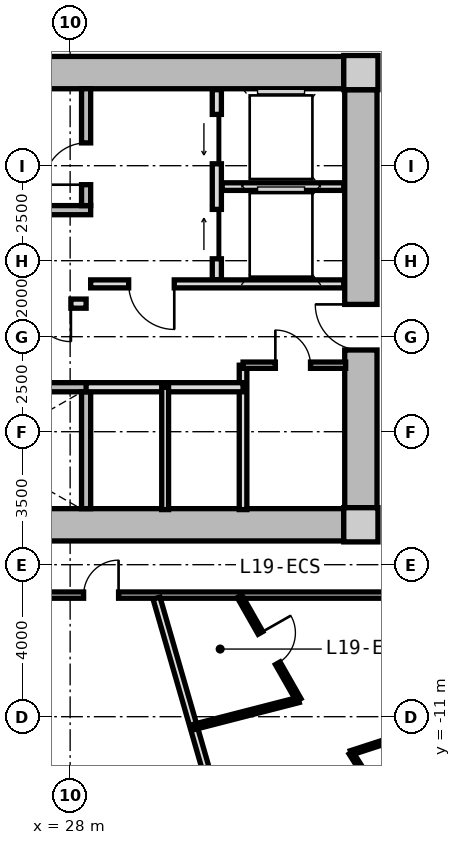
"""IFC4 building model, lengths in metres.
Left out: names, types, materials, properties, quantities, classifications, styles, units other than length and angle.
Written with IfcOpenShell. Run it as: python <this file> out.ifc"""

import sys

from ifc_helpers import new_model, si_unit, direction, frame, frame_2d, origin, origin_2d, place, context, subcontext, project, spatial, rectangle, extrude, source, transform, mapped, element, fill, save


model = new_model("IFC4")
c1 = context("Model", 3, precision=1e-05, world=origin(), true_north=direction((0.0, 1.0)))
c2 = subcontext(c1, "Body", "Model", "MODEL_VIEW")
j1 = project(units=[si_unit("LENGTHUNIT", "METRE"), si_unit("PLANEANGLEUNIT", "RADIAN")], contexts=[c1])
p1 = place(None, origin())
s1 = spatial("IfcSite", under=j1, at=p1, CompositionType="ELEMENT")
p2 = place(p1, origin())
s2 = spatial("IfcBuilding", under=s1, at=p2, CompositionType="ELEMENT")
p3 = place(p2, frame((0.0, 0.0, 64.3)))
s3 = spatial("IfcBuildingStorey", under=s2, at=p3, CompositionType="ELEMENT", Elevation=64.3)
m1 = source(origin(), c2, "Body", "SweptSolid", [
    extrude(rectangle(XDim=0.9, YDim=0.9, at=origin_2d()), origin(), (0.0, 0.0, 1.0), 3.05),
])
for number, where, z_axis, x_axis in (
    (1, (35.65, -5.95, 0.0), (0.0, 0.0, 1.0), (1.0, 0.0, 0.0)),
    (2, (35.65, 5.95, 0.0), (0.0, 0.0, 1.0), (1.0, 0.0, 0.0)),
):
    element("IfcColumn", number, at=place(p3, frame(where, z_axis=z_axis, x_axis=x_axis)), inside=s3, PredefinedType="COLUMN", context=c2, shape_type="MappedRepresentation", body=[
        mapped(m1, transform((0.0, 0.0, 0.0), x_axis=(1.0, 0.0, 0.0), y_axis=(0.0, 1.0, 0.0), z_axis=(0.0, 0.0, 1.0), scale=1.0)),
    ])
m2 = source(origin(), c2, "Body", "SweptSolid", [
    extrude(rectangle(XDim=14.4, YDim=0.85, at=frame_2d((7.2, 0.0))), origin(), (0.0, 0.0, 1.0), 2.79),
])
for number, where, z_axis, x_axis in (
    (3, (20.8, 5.95, 0.0), (0.0, 0.0, 1.0), (1.0, 0.0, 0.0)),
    (4, (35.2, -5.95, 0.0), (0.0, 0.0, 1.0), (-1.0, 0.0, 0.0)),
):
    element("IfcWall", number, at=place(p3, frame(where, z_axis=z_axis, x_axis=x_axis)), inside=s3, PredefinedType="SHEAR", context=c2, shape_type="MappedRepresentation", body=[
        mapped(m2, transform((0.0, 0.0, 0.0), x_axis=(1.0, 0.0, 0.0), y_axis=(0.0, 1.0, 0.0), z_axis=(0.0, 0.0, 1.0), scale=1.0)),
    ])
m3 = source(origin(), c2, "Body", "SweptSolid", [
    extrude(rectangle(XDim=11.0, YDim=0.85, at=frame_2d((5.5, 0.0))), origin(), (0.0, 0.0, 1.0), 2.79),
])
p4 = place(p3, frame((35.65, 5.5, 0.0), z_axis=(0.0, 0.0, 1.0), x_axis=(0.0, -1.0, 0.0)))
e5 = element("IfcWall", 5, at=p4, inside=s3, PredefinedType="SHEAR", context=c2, shape_type="MappedRepresentation", body=[
    mapped(m3, transform((0.0, 0.0, 0.0), x_axis=(1.0, 0.0, 0.0), y_axis=(0.0, 1.0, 0.0), z_axis=(0.0, 0.0, 1.0), scale=1.0)),
])
p5 = place(p4, frame((5.65, 0.0, 0.0)))
e6 = element("IfcOpeningElement", 6, at=p5, cuts=e5, PredefinedType="OPENING", context=c2, shape_type="SweptSolid", body=[
    extrude(rectangle(XDim=1.2, YDim=2.15, at=frame_2d((0.6, 1.075))), frame((0.0, 0.435, 0.0), z_axis=(0.0, -1.0, 0.0), x_axis=(1.0, 0.0, 0.0)), (0.0, 0.0, 1.0), 0.87),
])
m4 = source(origin(), c2, "Body", "SweptSolid", [
    extrude(rectangle(XDim=7.765, YDim=0.24, at=frame_2d((3.883, 0.0))), origin(), (0.0, 0.0, 1.0), 2.79),
])
p6 = place(p3, frame((20.775, 2.33, 0.0), z_axis=(0.0, 0.0, 1.0), x_axis=(1.0, 0.0, 0.0)))
e7 = element("IfcWall", 7, at=p6, inside=s3, PredefinedType="PARTITIONING", context=c2, shape_type="MappedRepresentation", body=[
    mapped(m4, transform((0.0, 0.0, 0.0), x_axis=(1.0, 0.0, 0.0), y_axis=(0.0, 1.0, 0.0), z_axis=(0.0, 0.0, 1.0), scale=1.0)),
])
m5 = source(origin(), c2, "Body", "SweptSolid", [
    extrude(rectangle(XDim=3.075, YDim=0.24, at=frame_2d((1.538, 0.0))), origin(), (0.0, 0.0, 1.0), 2.79),
])
p7 = place(p3, frame((28.42, 2.45, 0.0), z_axis=(0.0, 0.0, 1.0), x_axis=(0.0, 1.0, 0.0)))
e8 = element("IfcWall", 8, at=p7, inside=s3, PredefinedType="PARTITIONING", context=c2, shape_type="MappedRepresentation", body=[
    mapped(m5, transform((0.0, 0.0, 0.0), x_axis=(1.0, 0.0, 0.0), y_axis=(0.0, 1.0, 0.0), z_axis=(0.0, 0.0, 1.0), scale=1.0)),
])
p8 = place(p7, frame((0.55, 0.0, 0.0)))
e9 = element("IfcOpeningElement", 9, at=p8, cuts=e8, PredefinedType="OPENING", context=c2, shape_type="SweptSolid", body=[
    extrude(rectangle(XDim=1.1, YDim=2.15, at=frame_2d((0.55, 1.075))), frame((0.0, 0.13, 0.0), z_axis=(0.0, -1.0, 0.0), x_axis=(1.0, 0.0, 0.0)), (0.0, 0.0, 1.0), 0.26),
])
p9 = place(p3, frame((20.775, -2.33, 0.0), z_axis=(0.0, 0.0, 1.0), x_axis=(1.0, 0.0, 0.0)))
e10 = element("IfcWall", 10, at=p9, inside=s3, PredefinedType="PARTITIONING", context=c2, shape_type="MappedRepresentation", body=[
    mapped(m4, transform((0.0, 0.0, 0.0), x_axis=(1.0, 0.0, 0.0), y_axis=(0.0, 1.0, 0.0), z_axis=(0.0, 0.0, 1.0), scale=1.0)),
])
p10 = place(p9, frame((0.885, 0.0, 0.0)))
e11 = element("IfcOpeningElement", 11, at=p10, cuts=e10, PredefinedType="OPENING", context=c2, shape_type="SweptSolid", body=[
    extrude(rectangle(XDim=1.1, YDim=2.15, at=frame_2d((0.55, 1.075))), frame((0.0, 0.13, 0.0), z_axis=(0.0, -1.0, 0.0), x_axis=(1.0, 0.0, 0.0)), (0.0, 0.0, 1.0), 0.26),
])
p11 = place(p3, frame((28.42, -5.525, 0.0), z_axis=(0.0, 0.0, 1.0), x_axis=(0.0, 1.0, 0.0)))
e12 = element("IfcWall", 12, at=p11, inside=s3, PredefinedType="PARTITIONING", context=c2, shape_type="MappedRepresentation", body=[
    mapped(m5, transform((0.0, 0.0, 0.0), x_axis=(1.0, 0.0, 0.0), y_axis=(0.0, 1.0, 0.0), z_axis=(0.0, 0.0, 1.0), scale=1.0)),
])
m6 = source(origin(), c2, "Body", "SweptSolid", [
    extrude(rectangle(XDim=5.0, YDim=0.24, at=frame_2d((2.5, 0.0))), origin(), (0.0, 0.0, 1.0), 2.775),
])
p12 = place(p3, frame((31.86, 0.5, 0.0), z_axis=(0.0, 0.0, 1.0), x_axis=(0.0, 1.0, 0.0)))
e13 = element("IfcWall", 13, at=p12, inside=s3, PredefinedType="PARTITIONING", context=c2, shape_type="MappedRepresentation", body=[
    mapped(m6, transform((0.0, 0.0, 0.0), x_axis=(1.0, 0.0, 0.0), y_axis=(0.0, 1.0, 0.0), z_axis=(0.0, 0.0, 1.0), scale=1.0)),
])
p13 = place(p12, frame((3.05, 0.0, 0.0)))
e14 = element("IfcOpeningElement", 14, at=p13, cuts=e13, PredefinedType="OPENING", context=c2, shape_type="SweptSolid", body=[
    extrude(rectangle(XDim=1.3, YDim=2.2, at=frame_2d((0.65, 1.1))), frame((0.0, 0.13, 0.0), z_axis=(0.0, -1.0, 0.0), x_axis=(1.0, 0.0, 0.0)), (0.0, 0.0, 1.0), 0.26),
])
p14 = place(p12, frame((0.55, 0.0, 0.0)))
e15 = element("IfcOpeningElement", 15, at=p14, cuts=e13, PredefinedType="OPENING", context=c2, shape_type="SweptSolid", body=[
    extrude(rectangle(XDim=1.3, YDim=2.2, at=frame_2d((0.65, 1.1))), frame((0.0, 0.13, 0.0), z_axis=(0.0, -1.0, 0.0), x_axis=(1.0, 0.0, 0.0)), (0.0, 0.0, 1.0), 0.26),
])
m7 = source(origin(), c2, "Body", "SweptSolid", [
    extrude(rectangle(XDim=3.2, YDim=0.2, at=frame_2d((1.6, 0.0))), origin(), (0.0, 0.0, 1.0), 2.775),
])
p15 = place(p3, frame((32.0, 2.95, 0.0), z_axis=(0.0, 0.0, 1.0), x_axis=(1.0, 0.0, 0.0)))
e16 = element("IfcWall", 16, at=p15, inside=s3, PredefinedType="PARTITIONING", context=c2, shape_type="MappedRepresentation", body=[
    mapped(m7, transform((0.0, 0.0, 0.0), x_axis=(1.0, 0.0, 0.0), y_axis=(0.0, 1.0, 0.0), z_axis=(0.0, 0.0, 1.0), scale=1.0)),
])
m8 = source(origin(), c2, "Body", "SweptSolid", [
    extrude(rectangle(XDim=6.66, YDim=0.21, at=frame_2d((3.33, 0.0))), origin(), (0.0, 0.0, 1.0), 2.775),
])
p16 = place(p3, frame((28.54, 0.39, 0.0), z_axis=(0.0, 0.0, 1.0), x_axis=(1.0, 0.0, 0.0)))
e17 = element("IfcWall", 17, at=p16, inside=s3, PredefinedType="PARTITIONING", context=c2, shape_type="MappedRepresentation", body=[
    mapped(m8, transform((0.0, 0.0, 0.0), x_axis=(1.0, 0.0, 0.0), y_axis=(0.0, 1.0, 0.0), z_axis=(0.0, 0.0, 1.0), scale=1.0)),
])
p17 = place(p16, frame((1.0, 0.0, 0.0)))
e18 = element("IfcOpeningElement", 18, at=p17, cuts=e17, PredefinedType="OPENING", context=c2, shape_type="SweptSolid", body=[
    extrude(rectangle(XDim=1.2, YDim=2.15, at=frame_2d((0.6, 1.075))), frame((0.0, 0.115, 0.0), z_axis=(0.0, -1.0, 0.0), x_axis=(1.0, 0.0, 0.0)), (0.0, 0.0, 1.0), 0.23),
])
m9 = source(origin(), c2, "Body", "SweptSolid", [
    extrude(rectangle(XDim=7.62, YDim=0.24, at=frame_2d((3.81, 0.0))), origin(), (0.0, 0.0, 1.0), 2.775),
])
p18 = place(p3, frame((20.8, -0.13, 0.0), z_axis=(0.0, 0.0, 1.0), x_axis=(1.0, 0.0, 0.0)))
e19 = element("IfcWall", 19, at=p18, inside=s3, PredefinedType="PARTITIONING", context=c2, shape_type="MappedRepresentation", body=[
    mapped(m9, transform((0.0, 0.0, 0.0), x_axis=(1.0, 0.0, 0.0), y_axis=(0.0, 1.0, 0.0), z_axis=(0.0, 0.0, 1.0), scale=1.0)),
])
p19 = place(p18, frame((6.22, 0.0, 0.0)))
e20 = element("IfcOpeningElement", 20, at=p19, cuts=e19, PredefinedType="OPENING", context=c2, shape_type="SweptSolid", body=[
    extrude(rectangle(XDim=1.0, YDim=2.1, at=frame_2d((0.5, 1.05))), frame((0.0, 0.13, 0.0), z_axis=(0.0, -1.0, 0.0), x_axis=(1.0, 0.0, 0.0)), (0.0, 0.0, 1.0), 0.26),
])
p20 = place(p18, frame((0.85, 0.0, 0.0)))
e21 = element("IfcOpeningElement", 21, at=p20, cuts=e19, PredefinedType="OPENING", context=c2, shape_type="SweptSolid", body=[
    extrude(rectangle(XDim=1.1, YDim=2.2, at=frame_2d((0.55, 1.1))), frame((0.0, 0.13, 0.0), z_axis=(0.0, -1.0, 0.0), x_axis=(1.0, 0.0, 0.0)), (0.0, 0.0, 1.0), 0.26),
])
p21 = place(p18, frame((3.85, 0.0, 0.0)))
e22 = element("IfcOpeningElement", 22, at=p21, cuts=e19, PredefinedType="OPENING", context=c2, shape_type="SweptSolid", body=[
    extrude(rectangle(XDim=1.1, YDim=2.2, at=frame_2d((0.55, 1.1))), frame((0.0, 0.13, 0.0), z_axis=(0.0, -1.0, 0.0), x_axis=(1.0, 0.0, 0.0)), (0.0, 0.0, 1.0), 0.26),
])
m10 = source(origin(), c2, "Body", "SweptSolid", [
    extrude(rectangle(XDim=3.8, YDim=0.2, at=frame_2d((1.9, 0.0))), origin(), (0.0, 0.0, 1.0), 2.775),
])
p22 = place(p3, frame((32.55, -5.55, 0.0), z_axis=(0.0, 0.0, 1.0), x_axis=(0.0, 1.0, 0.0)))
e23 = element("IfcWall", 23, at=p22, inside=s3, PredefinedType="PARTITIONING", context=c2, shape_type="MappedRepresentation", body=[
    mapped(m10, transform((0.0, 0.0, 0.0), x_axis=(1.0, 0.0, 0.0), y_axis=(0.0, 1.0, 0.0), z_axis=(0.0, 0.0, 1.0), scale=1.0)),
])
m11 = source(origin(), c2, "Body", "SweptSolid", [
    extrude(rectangle(XDim=4.13, YDim=0.24, at=frame_2d((2.065, 0.0))), origin(), (0.0, 0.0, 1.0), 2.775),
])
p23 = place(p3, frame((28.42, -2.33, 0.0), z_axis=(0.0, 0.0, 1.0), x_axis=(1.0, 0.0, 0.0)))
e24 = element("IfcWall", 24, at=p23, inside=s3, PredefinedType="PARTITIONING", context=c2, shape_type="MappedRepresentation", body=[
    mapped(m11, transform((0.0, 0.0, 0.0), x_axis=(1.0, 0.0, 0.0), y_axis=(0.0, 1.0, 0.0), z_axis=(0.0, 0.0, 1.0), scale=1.0)),
])
m12 = source(origin(), c2, "Body", "SweptSolid", [
    extrude(rectangle(XDim=3.22, YDim=0.18, at=frame_2d((1.61, 0.0))), origin(), (0.0, 0.0, 1.0), 2.775),
])
p24 = place(p3, frame((30.5, -5.55, 0.0), z_axis=(0.0, 0.0, 1.0), x_axis=(0.0, 1.0, 0.0)))
e25 = element("IfcWall", 25, at=p24, inside=s3, PredefinedType="PARTITIONING", context=c2, shape_type="MappedRepresentation", body=[
    mapped(m12, transform((0.0, 0.0, 0.0), x_axis=(1.0, 0.0, 0.0), y_axis=(0.0, 1.0, 0.0), z_axis=(0.0, 0.0, 1.0), scale=1.0)),
])
m13 = source(origin(), c2, "Body", "SweptSolid", [
    extrude(rectangle(XDim=2.7, YDim=0.165, at=frame_2d((1.35, 0.0))), origin(), (0.0, 0.0, 1.0), 2.775),
])
p25 = place(p3, frame((32.55, -1.75, 0.0), z_axis=(0.0, 0.0, 1.0), x_axis=(1.0, 0.0, 0.0)))
e26 = element("IfcWall", 26, at=p25, inside=s3, PredefinedType="PARTITIONING", context=c2, shape_type="MappedRepresentation", body=[
    mapped(m13, transform((0.0, 0.0, 0.0), x_axis=(1.0, 0.0, 0.0), y_axis=(0.0, 1.0, 0.0), z_axis=(0.0, 0.0, 1.0), scale=1.0)),
])
p26 = place(p25, frame((0.85, 0.0, 0.0)))
e27 = element("IfcOpeningElement", 27, at=p26, cuts=e26, PredefinedType="OPENING", context=c2, shape_type="SweptSolid", body=[
    extrude(rectangle(XDim=0.925, YDim=2.1, at=frame_2d((0.462, 1.05))), frame((0.0, 0.093, 0.0), z_axis=(0.0, -1.0, 0.0), x_axis=(1.0, 0.0, 0.0)), (0.0, 0.0, 1.0), 0.185),
])
m14 = source(origin(), c2, "Body", "SweptSolid", [
    extrude(rectangle(XDim=19.0, YDim=0.165, at=frame_2d((9.5, 0.0))), origin(), (0.0, 0.0, 1.0), 2.775),
])
p27 = place(p3, frame((37.5, -7.8, 0.0), z_axis=(0.0, 0.0, 1.0), x_axis=(-1.0, 0.0, 0.0)))
e28 = element("IfcWall", 28, at=p27, inside=s3, PredefinedType="PARTITIONING", context=c2, shape_type="MappedRepresentation", body=[
    mapped(m14, transform((0.0, 0.0, 0.0), x_axis=(1.0, 0.0, 0.0), y_axis=(0.0, 1.0, 0.0), z_axis=(0.0, 0.0, 1.0), scale=1.0)),
])
p28 = place(p27, frame((10.523, 0.0, 0.0)))
e29 = element("IfcOpeningElement", 29, at=p28, cuts=e28, PredefinedType="OPENING", context=c2, shape_type="SweptSolid", body=[
    extrude(rectangle(XDim=0.92, YDim=2.1, at=frame_2d((0.46, 1.05))), frame((0.0, 0.093, 0.0), z_axis=(0.0, -1.0, 0.0), x_axis=(1.0, 0.0, 0.0)), (0.0, 0.0, 1.0), 0.185),
])
p29 = place(p27, frame((8.226, 0.0, 0.0)))
e30 = element("IfcOpeningElement", 30, at=p29, cuts=e28, PredefinedType="OPENING", context=c2, shape_type="SweptSolid", body=[
    extrude(rectangle(XDim=0.92, YDim=2.1, at=frame_2d((0.46, 1.05))), frame((0.0, 0.093, 0.0), z_axis=(0.0, -1.0, 0.0), x_axis=(1.0, 0.0, 0.0)), (0.0, 0.0, 1.0), 0.185),
])
m15 = source(origin(), c2, "Body", "SweptSolid", [
    extrude(rectangle(XDim=10.196, YDim=0.19, at=frame_2d((5.098, 0.0))), origin(), (0.0, 0.0, 1.0), 2.225),
])
p30 = place(p3, frame((30.273, -7.88, 0.0), z_axis=(0.0, 0.0, 1.0), x_axis=(0.277136420347, -0.960830580549, 0.0)))
e31 = element("IfcWall", 31, at=p30, inside=s3, PredefinedType="PARTITIONING", context=c2, shape_type="MappedRepresentation", body=[
    mapped(m15, transform((0.0, 0.0, 0.0), x_axis=(1.0, 0.0, 0.0), y_axis=(0.0, 1.0, 0.0), z_axis=(0.0, 0.0, 1.0), scale=1.0)),
])
m16 = source(origin(), c2, "Body", "SweptSolid", [
    extrude(rectangle(XDim=3.141, YDim=0.14, at=frame_2d((1.571, 0.0))), origin(), (0.0, 0.0, 1.0), 2.775),
])
p31 = place(p3, frame((32.458, -7.83, 0.0), z_axis=(0.0, 0.0, 1.0), x_axis=(0.494874486088, -0.868964465913, 0.0)))
e32 = element("IfcWall", 32, at=p31, inside=s3, PredefinedType="PARTITIONING", context=c2, shape_type="MappedRepresentation", body=[
    mapped(m16, transform((0.0, 0.0, 0.0), x_axis=(1.0, 0.0, 0.0), y_axis=(0.0, 1.0, 0.0), z_axis=(0.0, 0.0, 1.0), scale=1.0)),
])
p32 = place(p31, frame((1.111, 0.0, 0.0)))
e33 = element("IfcOpeningElement", 33, at=p32, cuts=e32, PredefinedType="OPENING", context=c2, shape_type="SweptSolid", body=[
    extrude(rectangle(XDim=0.92, YDim=2.1, at=frame_2d((0.46, 1.05))), frame((0.0, 0.08, 0.0), z_axis=(0.0, -1.0, 0.0), x_axis=(1.0, 0.0, 0.0)), (0.0, 0.0, 1.0), 0.16),
])
m17 = source(origin(), c2, "Body", "SweptSolid", [
    extrude(rectangle(XDim=2.868, YDim=0.14, at=frame_2d((1.434, 0.0))), origin(), (0.0, 0.0, 1.0), 2.775),
])
p33 = place(p3, frame((34.013, -10.56, 0.0), z_axis=(0.0, 0.0, 1.0), x_axis=(-0.968467705195, -0.249139125778, 0.0)))
e34 = element("IfcWall", 34, at=p33, inside=s3, PredefinedType="PARTITIONING", context=c2, shape_type="MappedRepresentation", body=[
    mapped(m17, transform((0.0, 0.0, 0.0), x_axis=(1.0, 0.0, 0.0), y_axis=(0.0, 1.0, 0.0), z_axis=(0.0, 0.0, 1.0), scale=1.0)),
])
m18 = source(origin(), c2, "Body", "SweptSolid", [
    extrude(rectangle(XDim=3.974, YDim=0.115, at=frame_2d((1.987, 0.0))), origin(), (0.0, 0.0, 1.0), 2.775),
])
p34 = place(p3, frame((35.389, -11.95, 0.0), z_axis=(0.0, 0.0, 1.0), x_axis=(0.534810918023, -0.844971764003, 0.0)))
e35 = element("IfcWall", 35, at=p34, inside=s3, PredefinedType="PARTITIONING", context=c2, shape_type="MappedRepresentation", body=[
    mapped(m18, transform((0.0, 0.0, 0.0), x_axis=(1.0, 0.0, 0.0), y_axis=(0.0, 1.0, 0.0), z_axis=(0.0, 0.0, 1.0), scale=1.0)),
])
m19 = source(origin(), c2, "Body", "SweptSolid", [
    extrude(rectangle(XDim=4.22, YDim=0.115, at=frame_2d((2.11, 0.0))), origin(), (0.0, 0.0, 1.0), 2.775),
])
p35 = place(p3, frame((35.389, -11.95, 0.0), z_axis=(0.0, 0.0, 1.0), x_axis=(0.951130539873, 0.308789080315, 0.0)))
e36 = element("IfcWall", 36, at=p35, inside=s3, PredefinedType="PARTITIONING", context=c2, shape_type="MappedRepresentation", body=[
    mapped(m19, transform((0.0, 0.0, 0.0), x_axis=(1.0, 0.0, 0.0), y_axis=(0.0, 1.0, 0.0), z_axis=(0.0, 0.0, 1.0), scale=1.0)),
])
p36 = place(p35, frame((1.635, 0.0, 0.0)))
e37 = element("IfcOpeningElement", 37, at=p36, cuts=e36, PredefinedType="OPENING", context=c2, shape_type="SweptSolid", body=[
    extrude(rectangle(XDim=0.95, YDim=2.1, at=frame_2d((0.475, 1.05))), frame((0.0, 0.067, 0.0), z_axis=(0.0, -1.0, 0.0), x_axis=(1.0, 0.0, 0.0)), (0.0, 0.0, 1.0), 0.135),
])
m20 = source(origin(), c2, "Body", "SweptSolid", [
    extrude(rectangle(XDim=1.1, YDim=2.15, at=frame_2d((0.55, 1.075))), frame((0.0, 0.025, 0.0), z_axis=(0.0, -1.0, 0.0), x_axis=(1.0, 0.0, 0.0)), (0.0, 0.0, 1.0), 0.05),
])
p37 = place(p8, origin())
e38 = element("IfcDoor", 38, at=p37, inside=s3, OperationType="SINGLE_SWING_LEFT", PredefinedType="DOOR", context=c2, shape_type="MappedRepresentation", body=[
    mapped(m20, transform((0.0, 0.0, 0.0), x_axis=(1.0, 0.0, 0.0), y_axis=(0.0, 1.0, 0.0), z_axis=(0.0, 0.0, 1.0), scale=1.0)),
])
fill(e9, e38)
m21 = source(origin(), c2, "Body", "SweptSolid", [
    extrude(rectangle(XDim=1.3, YDim=2.2, at=frame_2d((0.65, 1.1))), frame((0.0, 0.025, 0.0), z_axis=(0.0, -1.0, 0.0), x_axis=(1.0, 0.0, 0.0)), (0.0, 0.0, 1.0), 0.05),
])
p38 = place(p13, origin())
e39 = element("IfcDoor", 39, at=p38, inside=s3, OperationType="SLIDING_TO_LEFT", PredefinedType="DOOR", context=c2, shape_type="MappedRepresentation", body=[
    mapped(m21, transform((0.0, 0.0, 0.0), x_axis=(1.0, 0.0, 0.0), y_axis=(0.0, 1.0, 0.0), z_axis=(0.0, 0.0, 1.0), scale=1.0)),
])
fill(e14, e39)
p39 = place(p14, origin())
e40 = element("IfcDoor", 40, at=p39, inside=s3, OperationType="SLIDING_TO_RIGHT", PredefinedType="DOOR", context=c2, shape_type="MappedRepresentation", body=[
    mapped(m21, transform((0.0, 0.0, 0.0), x_axis=(1.0, 0.0, 0.0), y_axis=(0.0, 1.0, 0.0), z_axis=(0.0, 0.0, 1.0), scale=1.0)),
])
fill(e15, e40)
m22 = source(origin(), c2, "Body", "SweptSolid", [
    extrude(rectangle(XDim=1.2, YDim=2.15, at=frame_2d((0.6, 1.075))), frame((0.0, 0.025, 0.0), z_axis=(0.0, -1.0, 0.0), x_axis=(1.0, 0.0, 0.0)), (0.0, 0.0, 1.0), 0.05),
])
p40 = place(p17, frame((1.2, 0.0, 0.0), z_axis=(0.0, 0.0, 1.0), x_axis=(-1.0, 0.0, 0.0)))
e41 = element("IfcDoor", 41, at=p40, inside=s3, OperationType="SINGLE_SWING_LEFT", PredefinedType="DOOR", context=c2, shape_type="MappedRepresentation", body=[
    mapped(m22, transform((0.0, 0.0, 0.0), x_axis=(1.0, 0.0, 0.0), y_axis=(0.0, 1.0, 0.0), z_axis=(0.0, 0.0, 1.0), scale=1.0)),
])
fill(e18, e41)
p41 = place(p5, frame((1.2, 0.0, 0.0), z_axis=(0.0, 0.0, 1.0), x_axis=(-1.0, 0.0, 0.0)))
e42 = element("IfcDoor", 42, at=p41, inside=s3, OperationType="SINGLE_SWING_RIGHT", PredefinedType="DOOR", context=c2, shape_type="MappedRepresentation", body=[
    mapped(m22, transform((0.0, 0.0, 0.0), x_axis=(1.0, 0.0, 0.0), y_axis=(0.0, 1.0, 0.0), z_axis=(0.0, 0.0, 1.0), scale=1.0)),
])
fill(e6, e42)
m23 = source(origin(), c2, "Body", "SweptSolid", [
    extrude(rectangle(XDim=1.0, YDim=2.1, at=frame_2d((0.5, 1.05))), frame((0.0, 0.025, 0.0), z_axis=(0.0, -1.0, 0.0), x_axis=(1.0, 0.0, 0.0)), (0.0, 0.0, 1.0), 0.05),
])
p42 = place(p19, frame((1.0, 0.0, 0.0), z_axis=(0.0, 0.0, 1.0), x_axis=(-1.0, 0.0, 0.0)))
e43 = element("IfcDoor", 43, at=p42, inside=s3, OperationType="SINGLE_SWING_LEFT", PredefinedType="DOOR", context=c2, shape_type="MappedRepresentation", body=[
    mapped(m23, transform((0.0, 0.0, 0.0), x_axis=(1.0, 0.0, 0.0), y_axis=(0.0, 1.0, 0.0), z_axis=(0.0, 0.0, 1.0), scale=1.0)),
])
fill(e20, e43)
m24 = source(origin(), c2, "Body", "SweptSolid", [
    extrude(rectangle(XDim=0.925, YDim=2.1, at=frame_2d((0.462, 1.05))), frame((0.0, 0.025, 0.0), z_axis=(0.0, -1.0, 0.0), x_axis=(1.0, 0.0, 0.0)), (0.0, 0.0, 1.0), 0.05),
])
p43 = place(p26, origin())
e44 = element("IfcDoor", 44, at=p43, inside=s3, OperationType="SINGLE_SWING_LEFT", PredefinedType="DOOR", context=c2, shape_type="MappedRepresentation", body=[
    mapped(m24, transform((0.0, 0.0, 0.0), x_axis=(1.0, 0.0, 0.0), y_axis=(0.0, 1.0, 0.0), z_axis=(0.0, 0.0, 1.0), scale=1.0)),
])
fill(e27, e44)
m25 = source(origin(), c2, "Body", "SweptSolid", [
    extrude(rectangle(XDim=0.92, YDim=2.1, at=frame_2d((0.46, 1.05))), frame((0.0, 0.025, 0.0), z_axis=(0.0, -1.0, 0.0), x_axis=(1.0, 0.0, 0.0)), (0.0, 0.0, 1.0), 0.05),
])
p44 = place(p29, frame((0.92, 0.0, 0.0), z_axis=(0.0, 0.0, 1.0), x_axis=(-1.0, 0.0, 0.0)))
e45 = element("IfcDoor", 45, at=p44, inside=s3, OperationType="SINGLE_SWING_RIGHT", PredefinedType="DOOR", context=c2, shape_type="MappedRepresentation", body=[
    mapped(m25, transform((0.0, 0.0, 0.0), x_axis=(1.0, 0.0, 0.0), y_axis=(0.0, 1.0, 0.0), z_axis=(0.0, 0.0, 1.0), scale=1.0)),
])
fill(e30, e45)
p45 = place(p32, origin())
e46 = element("IfcDoor", 46, at=p45, inside=s3, OperationType="SINGLE_SWING_LEFT", PredefinedType="DOOR", context=c2, shape_type="MappedRepresentation", body=[
    mapped(m25, transform((0.0, 0.0, 0.0), x_axis=(1.0, 0.0, 0.0), y_axis=(0.0, 1.0, 0.0), z_axis=(0.0, 0.0, 1.0), scale=1.0)),
])
fill(e33, e46)
save(model, sys.argv[1])
